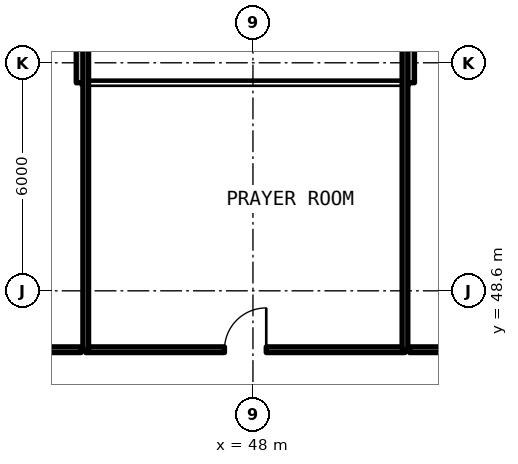
"""IFC4 building model, lengths in metres.
Left out: names, types, materials, properties, quantities, classifications, styles, units other than length and angle.
Written with IfcOpenShell. Run it as: python <this file> out.ifc"""

import sys

from ifc_helpers import new_model, si_unit, direction, frame, frame_2d, origin, place, context, subcontext, project, spatial, rectangle, extrude, element, fill, save


model = new_model("IFC4")
c1 = context("Model", 3, precision=1e-05, world=origin(), true_north=direction((0.0, 1.0)))
c2 = subcontext(c1, "Body", "Model", "MODEL_VIEW")
j1 = project(units=[si_unit("LENGTHUNIT", "METRE"), si_unit("PLANEANGLEUNIT", "RADIAN")], contexts=[c1])
p1 = place(None, origin())
s1 = spatial("IfcSite", under=j1, at=p1, CompositionType="ELEMENT")
p2 = place(p1, origin())
s2 = spatial("IfcBuilding", under=s1, at=p2, CompositionType="ELEMENT")
p3 = place(p2, frame((0.0, 0.0, 98.67)))
s3 = spatial("IfcBuildingStorey", under=s2, at=p3, CompositionType="ELEMENT", Elevation=98.67)
for number, where, z_axis, x_axis in (
    (1, (52.125, 57.475, 0.0), (0.0, 0.0, 1.0), (0.0, -1.0, 0.0)),
    (2, (43.475, 54.075, 0.0), (0.0, 0.0, 1.0), (0.0, 1.0, 0.0)),
):
    element("IfcWall", number, at=place(p3, frame(where, z_axis=z_axis, x_axis=x_axis)), inside=s3, PredefinedType="SOLIDWALL", context=c2, shape_type="SweptSolid", body=[
        extrude(rectangle(XDim=3.4, YDim=0.25, at=frame_2d((1.7, 0.0))), origin(), (0.0, 0.0, 1.0), 3.08),
    ])
p4 = place(p3, frame((43.6, 47.05, 0.0), z_axis=(0.0, 0.0, 1.0), x_axis=(1.0, 0.0, 0.0)))
e3 = element("IfcWall", 3, at=p4, inside=s3, PredefinedType="SOLIDWALL", context=c2, shape_type="SweptSolid", body=[
    extrude(rectangle(XDim=8.4, YDim=0.15, at=frame_2d((4.2, 0.0))), origin(), (0.0, 0.0, 1.0), 2.35),
])
p5 = place(p4, frame((3.65, 0.0, 0.0)))
e4 = element("IfcOpeningElement", 4, at=p5, cuts=e3, PredefinedType="OPENING", context=c2, shape_type="SweptSolid", body=[
    extrude(rectangle(XDim=1.1, YDim=2.15, at=frame_2d((0.55, 1.075))), frame((0.0, 0.085, 0.0), z_axis=(0.0, -1.0, 0.0), x_axis=(1.0, 0.0, 0.0)), (0.0, 0.0, 1.0), 0.17),
])
for number, where, z_axis, x_axis in (
    (5, (43.6, 47.05, 0.0), (0.0, 0.0, 1.0), (0.0, 1.0, 0.0)),
    (6, (52.0, 47.05, 0.0), (0.0, 0.0, 1.0), (0.0, 1.0, 0.0)),
):
    element("IfcWall", number, at=place(p3, frame(where, z_axis=z_axis, x_axis=x_axis)), inside=s3, PredefinedType="SOLIDWALL", context=c2, shape_type="SweptSolid", body=[
        extrude(rectangle(XDim=10.3, YDim=0.15, at=frame_2d((5.15, 0.0))), origin(), (0.0, 0.0, 1.0), 2.35),
    ])
p6 = place(p3, frame((38.692, 47.05, 0.0), z_axis=(0.0, 0.0, 1.0), x_axis=(1.0, 0.0, 0.0)))
e7 = element("IfcWall", 7, at=p6, inside=s3, PredefinedType="SOLIDWALL", context=c2, shape_type="SweptSolid", body=[
    extrude(rectangle(XDim=4.788, YDim=0.15, at=frame_2d((2.394, 0.0))), origin(), (0.0, 0.0, 1.0), 2.35),
])
p7 = place(p6, frame((2.653, 0.0, 0.0)))
e8 = element("IfcOpeningElement", 8, at=p7, cuts=e7, PredefinedType="OPENING", context=c2, shape_type="SweptSolid", body=[
    extrude(rectangle(XDim=0.95, YDim=2.15, at=frame_2d((0.475, 1.075))), frame((0.0, 0.085, 0.0), z_axis=(0.0, -1.0, 0.0), x_axis=(1.0, 0.0, 0.0)), (0.0, 0.0, 1.0), 0.17),
])
p8 = place(p3, frame((52.12, 47.05, 0.0), z_axis=(0.0, 0.0, 1.0), x_axis=(1.0, 0.0, 0.0)))
e9 = element("IfcWall", 9, at=p8, inside=s3, PredefinedType="SOLIDWALL", context=c2, shape_type="SweptSolid", body=[
    extrude(rectangle(XDim=7.503, YDim=0.15, at=frame_2d((3.751, 0.0))), origin(), (0.0, 0.0, 1.0), 2.35),
])
p9 = place(p8, frame((3.201, 0.0, 0.0)))
e10 = element("IfcOpeningElement", 10, at=p9, cuts=e9, PredefinedType="OPENING", context=c2, shape_type="SweptSolid", body=[
    extrude(rectangle(XDim=1.1, YDim=2.15, at=frame_2d((0.55, 1.075))), frame((0.0, 0.085, 0.0), z_axis=(0.0, -1.0, 0.0), x_axis=(1.0, 0.0, 0.0)), (0.0, 0.0, 1.0), 0.17),
])
p10 = place(p5, origin())
e11 = element("IfcDoor", 11, at=p10, inside=s3, OperationType="SINGLE_SWING_RIGHT", PredefinedType="DOOR", context=c2, shape_type="SweptSolid", body=[
    extrude(rectangle(XDim=1.1, YDim=2.15, at=frame_2d((0.55, 1.075))), frame((0.0, 0.025, 0.0), z_axis=(0.0, -1.0, 0.0), x_axis=(1.0, 0.0, 0.0)), (0.0, 0.0, 1.0), 0.05),
])
fill(e4, e11)
save(model, sys.argv[1])
